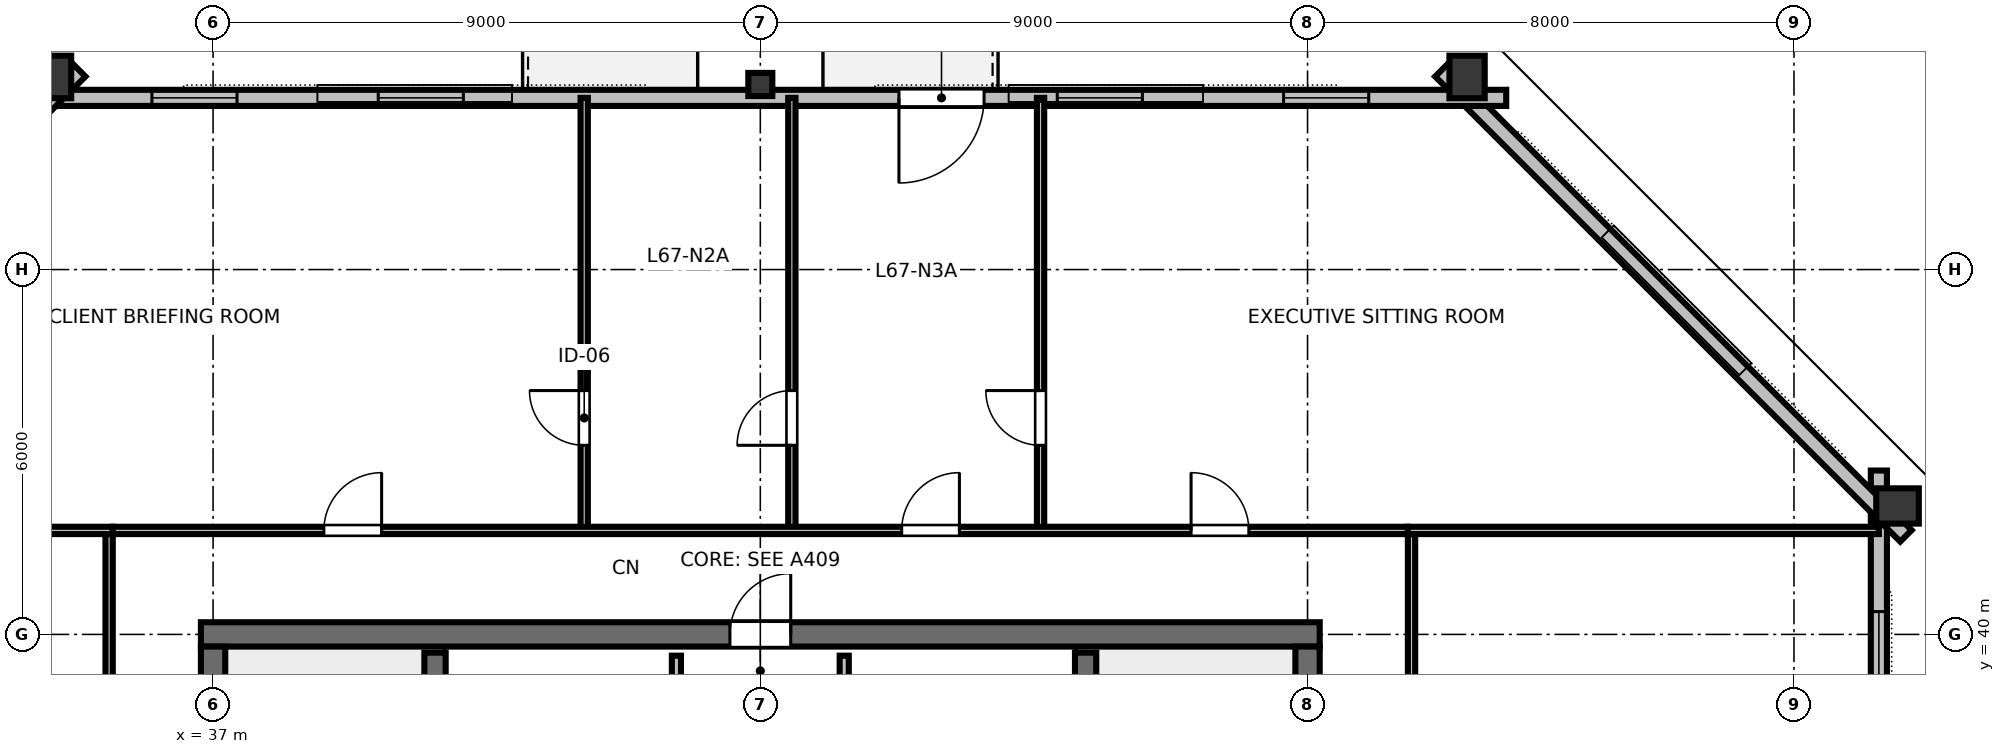
"""IFC4 building model, lengths in metres.
Left out: names, types, materials, properties, quantities, classifications, styles, units other than length and angle.
Written with IfcOpenShell. Run it as: python <this file> out.ifc"""

import sys

from ifc_helpers import new_model, si_unit, direction, frame, frame_2d, origin, origin_2d, place, context, subcontext, project, spatial, rectangle, hollow_rectangle, i_section, extrude, element, fill, save


model = new_model("IFC4")
c1 = context("Model", 3, precision=1e-05, world=origin(), true_north=direction((0.0, 1.0)))
c2 = subcontext(c1, "Body", "Model", "MODEL_VIEW")
j1 = project(units=[si_unit("LENGTHUNIT", "METRE"), si_unit("PLANEANGLEUNIT", "RADIAN")], contexts=[c1])
p1 = place(None, origin())
s1 = spatial("IfcSite", under=j1, at=p1, CompositionType="ELEMENT")
p2 = place(p1, origin())
s2 = spatial("IfcBuilding", under=s1, at=p2, CompositionType="ELEMENT")
p3 = place(p2, frame((0.0, 0.0, 253.8)))
s3 = spatial("IfcBuildingStorey", under=s2, at=p3, CompositionType="ELEMENT", Elevation=253.8)
p4 = place(p3, frame((36.8, 40.0, 0.0), z_axis=(0.0, 0.0, 1.0), x_axis=(1.0, 0.0, 0.0)))
e1 = element("IfcWall", 1, at=p4, inside=s3, PredefinedType="SHEAR", context=c2, shape_type="SweptSolid", body=[
    extrude(rectangle(XDim=18.4, YDim=0.4, at=frame_2d((9.2, 0.0))), origin(), (0.0, 0.0, 1.0), 3.36),
])
p5 = place(p4, frame((8.7, 0.0, 0.0)))
e2 = element("IfcOpeningElement", 2, at=p5, cuts=e1, PredefinedType="OPENING", context=c2, shape_type="SweptSolid", body=[
    extrude(rectangle(XDim=1.0, YDim=2.15, at=frame_2d((0.5, 1.075))), frame((0.0, 0.21, 0.0), z_axis=(0.0, -1.0, 0.0), x_axis=(1.0, 0.0, 0.0)), (0.0, 0.0, 1.0), 0.42),
])
p6 = place(p3, frame((37.0, 24.2, 0.0), z_axis=(0.0, 0.0, 1.0), x_axis=(0.0, 1.0, 0.0)))
e3 = element("IfcWall", 3, at=p6, inside=s3, PredefinedType="SHEAR", context=c2, shape_type="SweptSolid", body=[
    extrude(rectangle(XDim=15.6, YDim=0.4, at=frame_2d((7.8, 0.0))), origin(), (0.0, 0.0, 1.0), 3.36),
])
p7 = place(p6, frame((5.325, 0.0, 0.0)))
e4 = element("IfcOpeningElement", 4, at=p7, cuts=e3, PredefinedType="OPENING", context=c2, shape_type="SweptSolid", body=[
    extrude(rectangle(XDim=1.15, YDim=2.15, at=frame_2d((0.575, 1.075))), frame((0.0, 0.21, 0.0), z_axis=(0.0, -1.0, 0.0), x_axis=(1.0, 0.0, 0.0)), (0.0, 0.0, 1.0), 0.42),
])
p8 = place(p3, frame((55.0, 24.2, 0.0), z_axis=(0.0, 0.0, 1.0), x_axis=(0.0, 1.0, 0.0)))
e5 = element("IfcWall", 5, at=p8, inside=s3, PredefinedType="SHEAR", context=c2, shape_type="SweptSolid", body=[
    extrude(rectangle(XDim=15.6, YDim=0.4, at=frame_2d((7.8, 0.0))), origin(), (0.0, 0.0, 1.0), 3.36),
])
p9 = place(p8, frame((5.325, 0.0, 0.0)))
e6 = element("IfcOpeningElement", 6, at=p9, cuts=e5, PredefinedType="OPENING", context=c2, shape_type="SweptSolid", body=[
    extrude(rectangle(XDim=1.15, YDim=2.15, at=frame_2d((0.575, 1.075))), frame((0.0, 0.21, 0.0), z_axis=(0.0, -1.0, 0.0), x_axis=(1.0, 0.0, 0.0)), (0.0, 0.0, 1.0), 0.42),
])
for number, where, z_axis, x_axis in (
    (7, (64.703, 42.112, 0.0), (0.0, 0.0, 1.0), (0.0, 1.0, 0.0)),
    (8, (57.624, 49.167, 0.0), (0.0, 0.0, 1.0), (1.0, 0.0, 0.0)),
):
    element("IfcColumn", number, at=place(p3, frame(where, z_axis=z_axis, x_axis=x_axis)), inside=s3, PredefinedType="COLUMN", context=c2, shape_type="SweptSolid", body=[
        extrude(hollow_rectangle(XDim=0.58, YDim=0.7, WallThickness=0.032, at=origin_2d()), origin(), (0.0, 0.0, 1.0), 3.373),
    ])
p10 = place(p3, frame((46.0, 49.044, 0.0), z_axis=(0.0, 0.0, 1.0), x_axis=(1.0, 0.0, 0.0)))
e9 = element("IfcColumn", 9, at=p10, inside=s3, PredefinedType="COLUMN", context=c2, shape_type="SweptSolid", body=[
    extrude(i_section(OverallWidth=0.395, OverallDepth=0.38, WebThickness=0.019, FlangeThickness=0.03, FilletRadius=0.025, at=origin_2d()), origin(), (0.0, 0.0, 1.0), 3.373),
])
p11 = place(p3, frame((34.376, 49.167, 0.0), z_axis=(0.0, 0.0, 1.0), x_axis=(1.0, 0.0, 0.0)))
e10 = element("IfcColumn", 10, at=p11, inside=s3, PredefinedType="COLUMN", context=c2, shape_type="SweptSolid", body=[
    extrude(hollow_rectangle(XDim=0.58, YDim=0.7, WallThickness=0.032, at=origin_2d()), origin(), (0.0, 0.0, 1.0), 3.373),
])
p12 = place(p3, frame((64.396, 21.305, 0.0), z_axis=(0.0, 0.0, 1.0), x_axis=(0.0, 1.0, 0.0)))
e11 = element("IfcWall", 11, at=p12, inside=s3, PredefinedType="STANDARD", context=c2, shape_type="SweptSolid", body=[
    extrude(rectangle(XDim=21.389, YDim=0.265, at=frame_2d((10.695, 0.0))), origin(), (0.0, 0.0, 1.0), 2.832),
])
p13 = place(p12, frame((2.319, 0.0, 0.85)))
e12 = element("IfcOpeningElement", 12, at=p13, cuts=e11, PredefinedType="OPENING", context=c2, shape_type="SweptSolid", body=[
    extrude(rectangle(XDim=1.4, YDim=1.2, at=frame_2d((0.7, 0.6))), frame((0.0, 0.142, 0.0), z_axis=(0.0, -1.0, 0.0), x_axis=(1.0, 0.0, 0.0)), (0.0, 0.0, 1.0), 0.285),
])
p14 = place(p12, frame((6.157, 0.0, 0.85)))
e13 = element("IfcOpeningElement", 13, at=p14, cuts=e11, PredefinedType="OPENING", context=c2, shape_type="SweptSolid", body=[
    extrude(rectangle(XDim=1.4, YDim=1.2, at=frame_2d((0.7, 0.6))), frame((0.0, 0.142, 0.0), z_axis=(0.0, -1.0, 0.0), x_axis=(1.0, 0.0, 0.0)), (0.0, 0.0, 1.0), 0.285),
])
p15 = place(p12, frame((13.832, 0.0, 0.85)))
e14 = element("IfcOpeningElement", 14, at=p15, cuts=e11, PredefinedType="OPENING", context=c2, shape_type="SweptSolid", body=[
    extrude(rectangle(XDim=1.4, YDim=1.2, at=frame_2d((0.7, 0.6))), frame((0.0, 0.142, 0.0), z_axis=(0.0, -1.0, 0.0), x_axis=(1.0, 0.0, 0.0)), (0.0, 0.0, 1.0), 0.285),
])
p16 = place(p12, frame((17.67, 0.0, 0.85)))
e15 = element("IfcOpeningElement", 15, at=p16, cuts=e11, PredefinedType="OPENING", context=c2, shape_type="SweptSolid", body=[
    extrude(rectangle(XDim=1.4, YDim=1.2, at=frame_2d((0.7, 0.6))), frame((0.0, 0.142, 0.0), z_axis=(0.0, -1.0, 0.0), x_axis=(1.0, 0.0, 0.0)), (0.0, 0.0, 1.0), 0.285),
])
p17 = place(p3, frame((64.841, 41.62, 0.0), z_axis=(0.0, 0.0, 1.0), x_axis=(-0.707106781187, 0.707106781187, 0.0)))
e16 = element("IfcWall", 16, at=p17, inside=s3, PredefinedType="STANDARD", context=c2, shape_type="SweptSolid", body=[
    extrude(rectangle(XDim=10.816, YDim=0.265, at=frame_2d((5.408, 0.0))), origin(), (0.0, 0.0, 1.0), 2.832),
])
p18 = place(p3, frame((58.267, 48.823, 0.0), z_axis=(0.0, 0.0, 1.0), x_axis=(-1.0, 0.0, 0.0)))
e17 = element("IfcWall", 17, at=p18, inside=s3, PredefinedType="STANDARD", context=c2, shape_type="SweptSolid", body=[
    extrude(rectangle(XDim=24.535, YDim=0.265, at=frame_2d((12.267, 0.0))), origin(), (0.0, 0.0, 1.0), 2.832),
])
p19 = place(p18, frame((8.587, 0.0, 0.0)))
e18 = element("IfcOpeningElement", 18, at=p19, cuts=e17, PredefinedType="OPENING", context=c2, shape_type="SweptSolid", body=[
    extrude(rectangle(XDim=1.4, YDim=2.15, at=frame_2d((0.7, 1.075))), frame((0.0, 0.142, 0.0), z_axis=(0.0, -1.0, 0.0), x_axis=(1.0, 0.0, 0.0)), (0.0, 0.0, 1.0), 0.285),
])
p20 = place(p18, frame((2.261, 0.0, 0.85)))
e19 = element("IfcOpeningElement", 19, at=p20, cuts=e17, PredefinedType="OPENING", context=c2, shape_type="SweptSolid", body=[
    extrude(rectangle(XDim=1.4, YDim=1.2, at=frame_2d((0.7, 0.6))), frame((0.0, 0.142, 0.0), z_axis=(0.0, -1.0, 0.0), x_axis=(1.0, 0.0, 0.0)), (0.0, 0.0, 1.0), 0.285),
])
p21 = place(p18, frame((5.984, 0.0, 0.85)))
e20 = element("IfcOpeningElement", 20, at=p21, cuts=e17, PredefinedType="OPENING", context=c2, shape_type="SweptSolid", body=[
    extrude(rectangle(XDim=1.4, YDim=1.2, at=frame_2d((0.7, 0.6))), frame((0.0, 0.142, 0.0), z_axis=(0.0, -1.0, 0.0), x_axis=(1.0, 0.0, 0.0)), (0.0, 0.0, 1.0), 0.285),
])
p22 = place(p18, frame((17.151, 0.0, 0.85)))
e21 = element("IfcOpeningElement", 21, at=p22, cuts=e17, PredefinedType="OPENING", context=c2, shape_type="SweptSolid", body=[
    extrude(rectangle(XDim=1.4, YDim=1.2, at=frame_2d((0.7, 0.6))), frame((0.0, 0.142, 0.0), z_axis=(0.0, -1.0, 0.0), x_axis=(1.0, 0.0, 0.0)), (0.0, 0.0, 1.0), 0.285),
])
p23 = place(p18, frame((20.873, 0.0, 0.85)))
e22 = element("IfcOpeningElement", 22, at=p23, cuts=e17, PredefinedType="OPENING", context=c2, shape_type="SweptSolid", body=[
    extrude(rectangle(XDim=1.4, YDim=1.2, at=frame_2d((0.7, 0.6))), frame((0.0, 0.142, 0.0), z_axis=(0.0, -1.0, 0.0), x_axis=(1.0, 0.0, 0.0)), (0.0, 0.0, 1.0), 0.285),
])
p24 = place(p3, frame((34.807, 49.269, 0.0), z_axis=(0.0, 0.0, 1.0), x_axis=(-0.707106781187, -0.707106781187, 0.0)))
e23 = element("IfcWall", 23, at=p24, inside=s3, PredefinedType="STANDARD", context=c2, shape_type="SweptSolid", body=[
    extrude(rectangle(XDim=10.816, YDim=0.265, at=frame_2d((5.408, 0.0))), origin(), (0.0, 0.0, 1.0), 2.832),
])
for number, where, z_axis, x_axis in (
    (24, (40.65, 32.0, 0.0), (0.0, 0.0, 1.0), (0.0, 1.0, 0.0)),
    (25, (51.35, 32.0, 0.0), (0.0, 0.0, 1.0), (0.0, 1.0, 0.0)),
):
    element("IfcWall", number, at=place(p3, frame(where, z_axis=z_axis, x_axis=x_axis)), inside=s3, PredefinedType="SHEAR", context=c2, shape_type="SweptSolid", body=[
        extrude(rectangle(XDim=7.7, YDim=0.35, at=frame_2d((3.85, 0.0))), origin(), (0.0, 0.0, 1.0), 3.6),
    ])
p25 = place(p3, frame((44.62, 35.72, 0.0), z_axis=(0.0, 0.0, 1.0), x_axis=(0.0, 1.0, 0.0)))
e26 = element("IfcWall", 26, at=p25, inside=s3, PredefinedType="PARTITIONING", context=c2, shape_type="SweptSolid", body=[
    extrude(rectangle(XDim=3.93, YDim=0.15, at=frame_2d((1.965, 0.0))), origin(), (0.0, 0.0, 1.0), 3.375),
])
p26 = place(p25, frame((1.5, 0.0, 0.0)))
e27 = element("IfcOpeningElement", 27, at=p26, cuts=e26, PredefinedType="OPENING", context=c2, shape_type="SweptSolid", body=[
    extrude(rectangle(XDim=0.9, YDim=2.15, at=frame_2d((0.45, 1.075))), frame((0.0, 0.085, 0.0), z_axis=(0.0, -1.0, 0.0), x_axis=(1.0, 0.0, 0.0)), (0.0, 0.0, 1.0), 0.17),
])
p27 = place(p3, frame((47.38, 35.72, 0.0), z_axis=(0.0, 0.0, 1.0), x_axis=(0.0, 1.0, 0.0)))
e28 = element("IfcWall", 28, at=p27, inside=s3, PredefinedType="PARTITIONING", context=c2, shape_type="SweptSolid", body=[
    extrude(rectangle(XDim=3.93, YDim=0.15, at=frame_2d((1.965, 0.0))), origin(), (0.0, 0.0, 1.0), 3.375),
])
p28 = place(p27, frame((1.5, 0.0, 0.0)))
e29 = element("IfcOpeningElement", 29, at=p28, cuts=e28, PredefinedType="OPENING", context=c2, shape_type="SweptSolid", body=[
    extrude(rectangle(XDim=0.9, YDim=2.15, at=frame_2d((0.45, 1.075))), frame((0.0, 0.085, 0.0), z_axis=(0.0, -1.0, 0.0), x_axis=(1.0, 0.0, 0.0)), (0.0, 0.0, 1.0), 0.17),
])
p29 = place(p3, frame((43.104, 41.71, 0.0), z_axis=(0.0, 0.0, 1.0), x_axis=(0.0, 1.0, 0.0)))
e30 = element("IfcWall", 30, at=p29, inside=s3, PredefinedType="PARTITIONING", context=c2, shape_type="SweptSolid", body=[
    extrude(rectangle(XDim=7.114, YDim=0.12, at=frame_2d((3.557, 0.0))), origin(), (0.0, 0.0, 1.0), 2.655),
])
p30 = place(p29, frame((1.4, 0.0, 0.0)))
e31 = element("IfcOpeningElement", 31, at=p30, cuts=e30, PredefinedType="OPENING", context=c2, shape_type="SweptSolid", body=[
    extrude(rectangle(XDim=0.9, YDim=2.15, at=frame_2d((0.45, 1.075))), frame((0.0, 0.07, 0.0), z_axis=(0.0, -1.0, 0.0), x_axis=(1.0, 0.0, 0.0)), (0.0, 0.0, 1.0), 0.14),
])
p31 = place(p3, frame((46.519, 41.71, 0.0), z_axis=(0.0, 0.0, 1.0), x_axis=(0.0, 1.0, 0.0)))
e32 = element("IfcWall", 32, at=p31, inside=s3, PredefinedType="PARTITIONING", context=c2, shape_type="SweptSolid", body=[
    extrude(rectangle(XDim=7.114, YDim=0.12, at=frame_2d((3.557, 0.0))), origin(), (0.0, 0.0, 1.0), 2.655),
])
p32 = place(p31, frame((1.4, 0.0, 0.0)))
e33 = element("IfcOpeningElement", 33, at=p32, cuts=e32, PredefinedType="OPENING", context=c2, shape_type="SweptSolid", body=[
    extrude(rectangle(XDim=0.9, YDim=2.15, at=frame_2d((0.45, 1.075))), frame((0.0, 0.07, 0.0), z_axis=(0.0, -1.0, 0.0), x_axis=(1.0, 0.0, 0.0)), (0.0, 0.0, 1.0), 0.14),
])
p33 = place(p3, frame((50.609, 41.71, 0.0), z_axis=(0.0, 0.0, 1.0), x_axis=(0.0, 1.0, 0.0)))
e34 = element("IfcWall", 34, at=p33, inside=s3, PredefinedType="PARTITIONING", context=c2, shape_type="SweptSolid", body=[
    extrude(rectangle(XDim=7.114, YDim=0.12, at=frame_2d((3.557, 0.0))), origin(), (0.0, 0.0, 1.0), 2.655),
])
p34 = place(p33, frame((1.4, 0.0, 0.0)))
e35 = element("IfcOpeningElement", 35, at=p34, cuts=e34, PredefinedType="OPENING", context=c2, shape_type="SweptSolid", body=[
    extrude(rectangle(XDim=0.9, YDim=2.15, at=frame_2d((0.45, 1.075))), frame((0.0, 0.07, 0.0), z_axis=(0.0, -1.0, 0.0), x_axis=(1.0, 0.0, 0.0)), (0.0, 0.0, 1.0), 0.14),
])
p35 = place(p3, frame((35.35, 41.71, 0.0), z_axis=(0.0, 0.0, 1.0), x_axis=(1.0, 0.0, 0.0)))
e36 = element("IfcWall", 36, at=p35, inside=s3, PredefinedType="PARTITIONING", context=c2, shape_type="SweptSolid", body=[
    extrude(rectangle(XDim=21.3, YDim=0.12, at=frame_2d((10.65, 0.0))), origin(), (0.0, 0.0, 1.0), 2.655),
])
p36 = place(p35, frame((3.472, 0.0, 0.0)))
e37 = element("IfcOpeningElement", 37, at=p36, cuts=e36, PredefinedType="OPENING", context=c2, shape_type="SweptSolid", body=[
    extrude(rectangle(XDim=0.95, YDim=2.15, at=frame_2d((0.475, 1.075))), frame((0.0, 0.07, 0.0), z_axis=(0.0, -1.0, 0.0), x_axis=(1.0, 0.0, 0.0)), (0.0, 0.0, 1.0), 0.14),
])
p37 = place(p35, frame((12.975, 0.0, 0.0)))
e38 = element("IfcOpeningElement", 38, at=p37, cuts=e36, PredefinedType="OPENING", context=c2, shape_type="SweptSolid", body=[
    extrude(rectangle(XDim=0.95, YDim=2.15, at=frame_2d((0.475, 1.075))), frame((0.0, 0.07, 0.0), z_axis=(0.0, -1.0, 0.0), x_axis=(1.0, 0.0, 0.0)), (0.0, 0.0, 1.0), 0.14),
])
p38 = place(p35, frame((17.735, 0.0, 0.0)))
e39 = element("IfcOpeningElement", 39, at=p38, cuts=e36, PredefinedType="OPENING", context=c2, shape_type="SweptSolid", body=[
    extrude(rectangle(XDim=0.95, YDim=2.15, at=frame_2d((0.475, 1.075))), frame((0.0, 0.07, 0.0), z_axis=(0.0, -1.0, 0.0), x_axis=(1.0, 0.0, 0.0)), (0.0, 0.0, 1.0), 0.14),
])
p39 = place(p3, frame((35.29, 22.35, 0.0), z_axis=(0.0, 0.0, 1.0), x_axis=(0.0, 1.0, 0.0)))
e40 = element("IfcWall", 40, at=p39, inside=s3, PredefinedType="PARTITIONING", context=c2, shape_type="SweptSolid", body=[
    extrude(rectangle(XDim=19.3, YDim=0.12, at=frame_2d((9.65, 0.0))), origin(), (0.0, 0.0, 1.0), 2.655),
])
p40 = place(p39, frame((3.656, 0.0, 0.0)))
e41 = element("IfcOpeningElement", 41, at=p40, cuts=e40, PredefinedType="OPENING", context=c2, shape_type="SweptSolid", body=[
    extrude(rectangle(XDim=0.95, YDim=2.15, at=frame_2d((0.475, 1.075))), frame((0.0, 0.07, 0.0), z_axis=(0.0, -1.0, 0.0), x_axis=(1.0, 0.0, 0.0)), (0.0, 0.0, 1.0), 0.14),
])
p41 = place(p39, frame((13.106, 0.0, 0.0)))
e42 = element("IfcOpeningElement", 42, at=p41, cuts=e40, PredefinedType="OPENING", context=c2, shape_type="SweptSolid", body=[
    extrude(rectangle(XDim=0.95, YDim=2.15, at=frame_2d((0.475, 1.075))), frame((0.0, 0.07, 0.0), z_axis=(0.0, -1.0, 0.0), x_axis=(1.0, 0.0, 0.0)), (0.0, 0.0, 1.0), 0.14),
])
p42 = place(p3, frame((56.71, 22.35, 0.0), z_axis=(0.0, 0.0, 1.0), x_axis=(0.0, 1.0, 0.0)))
e43 = element("IfcWall", 43, at=p42, inside=s3, PredefinedType="PARTITIONING", context=c2, shape_type="SweptSolid", body=[
    extrude(rectangle(XDim=19.3, YDim=0.12, at=frame_2d((9.65, 0.0))), origin(), (0.0, 0.0, 1.0), 2.655),
])
p43 = place(p42, frame((5.657, 0.0, 0.0)))
e44 = element("IfcOpeningElement", 44, at=p43, cuts=e43, PredefinedType="OPENING", context=c2, shape_type="SweptSolid", body=[
    extrude(rectangle(XDim=0.95, YDim=2.15, at=frame_2d((0.475, 1.075))), frame((0.0, 0.07, 0.0), z_axis=(0.0, -1.0, 0.0), x_axis=(1.0, 0.0, 0.0)), (0.0, 0.0, 1.0), 0.14),
])
p44 = place(p42, frame((15.107, 0.0, 0.0)))
e45 = element("IfcOpeningElement", 45, at=p44, cuts=e43, PredefinedType="OPENING", context=c2, shape_type="SweptSolid", body=[
    extrude(rectangle(XDim=0.95, YDim=2.15, at=frame_2d((0.475, 1.075))), frame((0.0, 0.07, 0.0), z_axis=(0.0, -1.0, 0.0), x_axis=(1.0, 0.0, 0.0)), (0.0, 0.0, 1.0), 0.14),
])
for number, where, z_axis, x_axis in (
    (46, (35.35, 41.71, 0.0), (0.0, 0.0, 1.0), (-1.0, 0.0, 0.0)),
    (47, (56.65, 41.71, 0.0), (0.0, 0.0, 1.0), (1.0, 0.0, 0.0)),
):
    element("IfcWall", number, at=place(p3, frame(where, z_axis=z_axis, x_axis=x_axis)), inside=s3, PredefinedType="PARTITIONING", context=c2, shape_type="SweptSolid", body=[
        extrude(rectangle(XDim=7.747, YDim=0.12, at=frame_2d((3.873, 0.0))), origin(), (0.0, 0.0, 1.0), 2.655),
    ])
p45 = place(p16, origin())
e48 = element("IfcWindow", 48, at=p45, inside=s3, PartitioningType="SINGLE_PANEL", PredefinedType="WINDOW", context=c2, shape_type="SweptSolid", body=[
    extrude(rectangle(XDim=1.4, YDim=1.2, at=frame_2d((0.7, 0.6))), frame((0.0, 0.03, 0.0), z_axis=(0.0, -1.0, 0.0), x_axis=(1.0, 0.0, 0.0)), (0.0, 0.0, 1.0), 0.06),
])
fill(e15, e48)
p46 = place(p19, origin())
e49 = element("IfcDoor", 49, at=p46, inside=s3, OperationType="SINGLE_SWING_RIGHT", PredefinedType="DOOR", context=c2, shape_type="SweptSolid", body=[
    extrude(rectangle(XDim=1.4, YDim=2.15, at=frame_2d((0.7, 1.075))), frame((0.0, 0.025, 0.0), z_axis=(0.0, -1.0, 0.0), x_axis=(1.0, 0.0, 0.0)), (0.0, 0.0, 1.0), 0.05),
])
fill(e18, e49)
p47 = place(p20, origin())
e50 = element("IfcWindow", 50, at=p47, inside=s3, PartitioningType="SINGLE_PANEL", PredefinedType="WINDOW", context=c2, shape_type="SweptSolid", body=[
    extrude(rectangle(XDim=1.4, YDim=1.2, at=frame_2d((0.7, 0.6))), frame((0.0, 0.03, 0.0), z_axis=(0.0, -1.0, 0.0), x_axis=(1.0, 0.0, 0.0)), (0.0, 0.0, 1.0), 0.06),
])
fill(e19, e50)
p48 = place(p21, origin())
e51 = element("IfcWindow", 51, at=p48, inside=s3, PartitioningType="SINGLE_PANEL", PredefinedType="WINDOW", context=c2, shape_type="SweptSolid", body=[
    extrude(rectangle(XDim=1.4, YDim=1.2, at=frame_2d((0.7, 0.6))), frame((0.0, 0.03, 0.0), z_axis=(0.0, -1.0, 0.0), x_axis=(1.0, 0.0, 0.0)), (0.0, 0.0, 1.0), 0.06),
])
fill(e20, e51)
p49 = place(p22, origin())
e52 = element("IfcWindow", 52, at=p49, inside=s3, PartitioningType="SINGLE_PANEL", PredefinedType="WINDOW", context=c2, shape_type="SweptSolid", body=[
    extrude(rectangle(XDim=1.4, YDim=1.2, at=frame_2d((0.7, 0.6))), frame((0.0, 0.03, 0.0), z_axis=(0.0, -1.0, 0.0), x_axis=(1.0, 0.0, 0.0)), (0.0, 0.0, 1.0), 0.06),
])
fill(e21, e52)
p50 = place(p23, origin())
e53 = element("IfcWindow", 53, at=p50, inside=s3, PartitioningType="SINGLE_PANEL", PredefinedType="WINDOW", context=c2, shape_type="SweptSolid", body=[
    extrude(rectangle(XDim=1.4, YDim=1.2, at=frame_2d((0.7, 0.6))), frame((0.0, 0.03, 0.0), z_axis=(0.0, -1.0, 0.0), x_axis=(1.0, 0.0, 0.0)), (0.0, 0.0, 1.0), 0.06),
])
fill(e22, e53)
p51 = place(p5, origin())
e54 = element("IfcDoor", 54, at=p51, inside=s3, OperationType="SINGLE_SWING_RIGHT", PredefinedType="DOOR", context=c2, shape_type="SweptSolid", body=[
    extrude(rectangle(XDim=1.0, YDim=2.15, at=frame_2d((0.5, 1.075))), frame((0.0, 0.025, 0.0), z_axis=(0.0, -1.0, 0.0), x_axis=(1.0, 0.0, 0.0)), (0.0, 0.0, 1.0), 0.05),
])
fill(e2, e54)
p52 = place(p30, origin())
e55 = element("IfcDoor", 55, at=p52, inside=s3, OperationType="SINGLE_SWING_RIGHT", PredefinedType="DOOR", context=c2, shape_type="SweptSolid", body=[
    extrude(rectangle(XDim=0.9, YDim=2.15, at=frame_2d((0.45, 1.075))), frame((0.0, 0.025, 0.0), z_axis=(0.0, -1.0, 0.0), x_axis=(1.0, 0.0, 0.0)), (0.0, 0.0, 1.0), 0.05),
])
fill(e31, e55)
p53 = place(p32, origin())
e56 = element("IfcDoor", 56, at=p53, inside=s3, OperationType="SINGLE_SWING_LEFT", PredefinedType="DOOR", context=c2, shape_type="SweptSolid", body=[
    extrude(rectangle(XDim=0.9, YDim=2.15, at=frame_2d((0.45, 1.075))), frame((0.0, 0.025, 0.0), z_axis=(0.0, -1.0, 0.0), x_axis=(1.0, 0.0, 0.0)), (0.0, 0.0, 1.0), 0.05),
])
fill(e33, e56)
p54 = place(p34, origin())
e57 = element("IfcDoor", 57, at=p54, inside=s3, OperationType="SINGLE_SWING_RIGHT", PredefinedType="DOOR", context=c2, shape_type="SweptSolid", body=[
    extrude(rectangle(XDim=0.9, YDim=2.15, at=frame_2d((0.45, 1.075))), frame((0.0, 0.025, 0.0), z_axis=(0.0, -1.0, 0.0), x_axis=(1.0, 0.0, 0.0)), (0.0, 0.0, 1.0), 0.05),
])
fill(e35, e57)
p55 = place(p36, origin())
e58 = element("IfcDoor", 58, at=p55, inside=s3, OperationType="SINGLE_SWING_RIGHT", PredefinedType="DOOR", context=c2, shape_type="SweptSolid", body=[
    extrude(rectangle(XDim=0.95, YDim=2.15, at=frame_2d((0.475, 1.075))), frame((0.0, 0.025, 0.0), z_axis=(0.0, -1.0, 0.0), x_axis=(1.0, 0.0, 0.0)), (0.0, 0.0, 1.0), 0.05),
])
fill(e37, e58)
p56 = place(p37, origin())
e59 = element("IfcDoor", 59, at=p56, inside=s3, OperationType="SINGLE_SWING_RIGHT", PredefinedType="DOOR", context=c2, shape_type="SweptSolid", body=[
    extrude(rectangle(XDim=0.95, YDim=2.15, at=frame_2d((0.475, 1.075))), frame((0.0, 0.025, 0.0), z_axis=(0.0, -1.0, 0.0), x_axis=(1.0, 0.0, 0.0)), (0.0, 0.0, 1.0), 0.05),
])
fill(e38, e59)
p57 = place(p38, origin())
e60 = element("IfcDoor", 60, at=p57, inside=s3, OperationType="SINGLE_SWING_LEFT", PredefinedType="DOOR", context=c2, shape_type="SweptSolid", body=[
    extrude(rectangle(XDim=0.95, YDim=2.15, at=frame_2d((0.475, 1.075))), frame((0.0, 0.025, 0.0), z_axis=(0.0, -1.0, 0.0), x_axis=(1.0, 0.0, 0.0)), (0.0, 0.0, 1.0), 0.05),
])
fill(e39, e60)
save(model, sys.argv[1])
